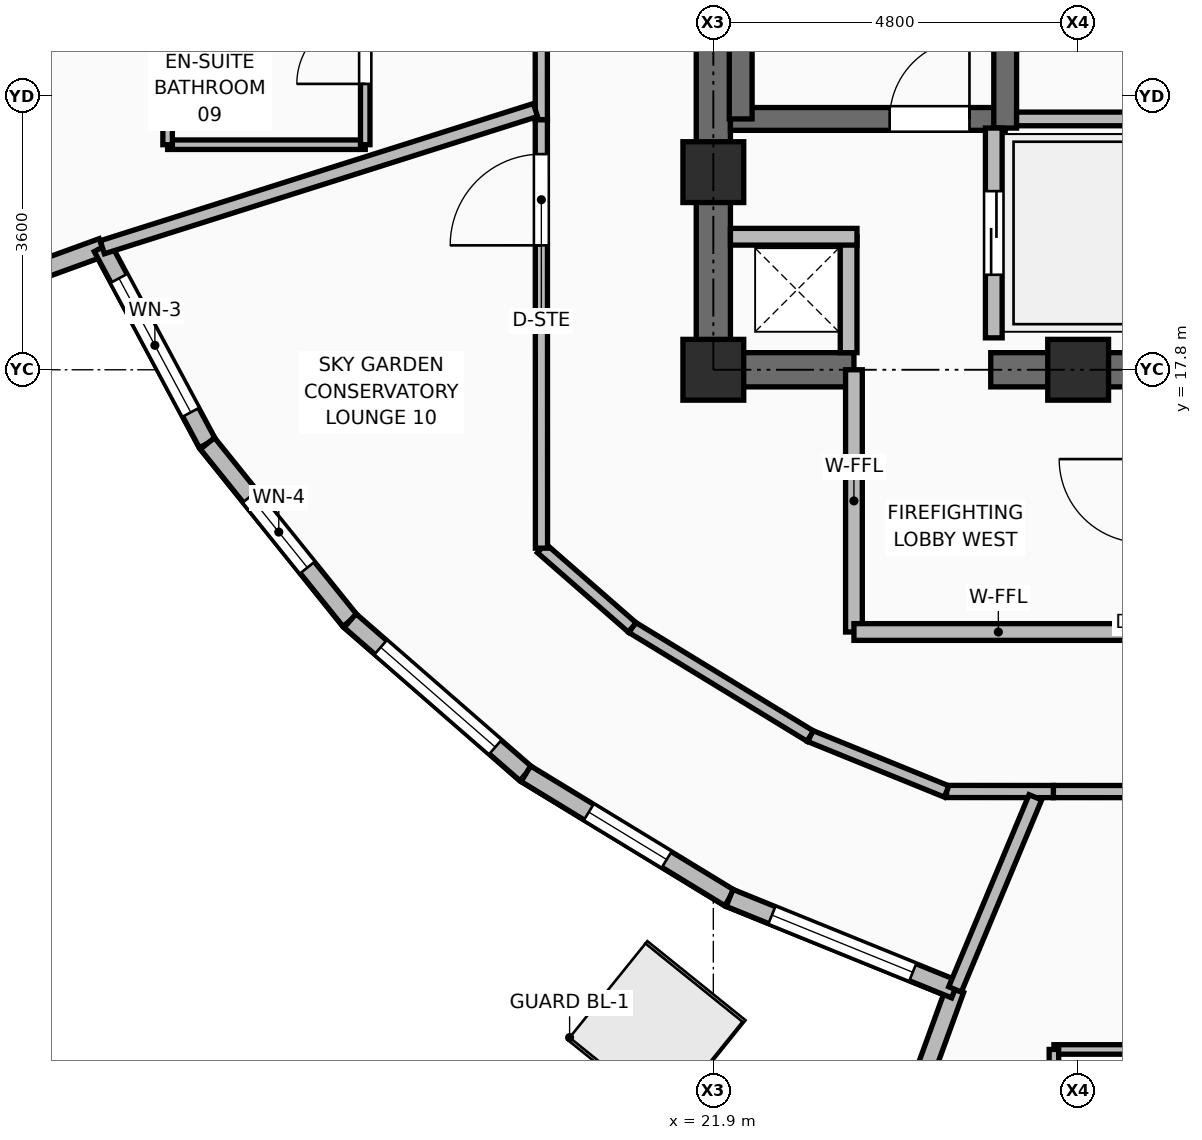
"""IFC4 building model, lengths in metres.
Left out: names, types, materials, properties, quantities, classifications, styles, units other than length and angle.
Written with IfcOpenShell. Run it as: python <this file> out.ifc"""

import sys

from ifc_helpers import new_model, si_unit, direction, frame, frame_2d, origin, origin_2d, place, context, subcontext, project, spatial, rectangle, extrude, element, fill, save


model = new_model("IFC4")
c1 = context("Model", 3, precision=1e-05, world=origin(), true_north=direction((0.0, 1.0)))
c2 = subcontext(c1, "Body", "Model", "MODEL_VIEW")
j1 = project(units=[si_unit("LENGTHUNIT", "METRE"), si_unit("PLANEANGLEUNIT", "RADIAN")], contexts=[c1])
p1 = place(None, origin())
s1 = spatial("IfcSite", under=j1, at=p1, CompositionType="ELEMENT")
p2 = place(p1, origin())
s2 = spatial("IfcBuilding", under=s1, at=p2, CompositionType="ELEMENT")
p3 = place(p2, frame((0.0, 0.0, 212.4)))
s3 = spatial("IfcBuildingStorey", under=s2, at=p3, CompositionType="ELEMENT", Elevation=212.4)
for number, where, z_axis, x_axis in (
    (1, (21.9, 17.8, 0.0), (0.0, 0.0, 1.0), (1.0, 0.0, 0.0)),
    (2, (26.7, 17.8, 0.0), (0.0, 0.0, 1.0), (1.0, 0.0, 0.0)),
    (3, (21.9, 20.4, 0.0), (0.0, 0.0, 1.0), (1.0, 0.0, 0.0)),
):
    element("IfcColumn", number, at=place(p3, frame(where, z_axis=z_axis, x_axis=x_axis)), inside=s3, PredefinedType="COLUMN", context=c2, shape_type="SweptSolid", body=[
        extrude(rectangle(XDim=0.8, YDim=0.8, at=origin_2d()), origin(), (0.0, 0.0, 1.0), 3.75),
    ])
p4 = place(p3, frame((10.29, 18.113, 0.0), z_axis=(0.0, 0.0, 1.0), x_axis=(0.939750271596, 0.34186170747, 0.0)))
e4 = element("IfcWall", 4, at=p4, inside=s3, PredefinedType="SOLIDWALL", context=c2, shape_type="SweptSolid", body=[
    extrude(rectangle(XDim=3.8, YDim=0.24, at=frame_2d((1.9, 0.0))), origin(), (0.0, 0.0, 1.0), 3.57),
])
p5 = place(p3, frame((25.08, 9.648, 0.0), z_axis=(0.0, 0.0, 1.0), x_axis=(-0.342088633789, -0.939667689469, 0.0)))
e5 = element("IfcWall", 5, at=p5, inside=s3, PredefinedType="SOLIDWALL", context=c2, shape_type="SweptSolid", body=[
    extrude(rectangle(XDim=3.8, YDim=0.24, at=frame_2d((1.9, 0.0))), origin(), (0.0, 0.0, 1.0), 3.57),
])
p6 = place(p3, frame((13.861, 19.412, 0.0), z_axis=(0.0, 0.0, 1.0), x_axis=(0.472249177179, -0.881465095539, 0.0)))
e6 = element("IfcWall", 6, at=p6, inside=s3, PredefinedType="SOLIDWALL", context=c2, shape_type="SweptSolid", body=[
    extrude(rectangle(XDim=2.928, YDim=0.24, at=frame_2d((1.464, 0.0))), origin(), (0.0, 0.0, 1.0), 3.57),
])
p7 = place(p6, frame((0.464, 0.0, 0.85)))
e7 = element("IfcOpeningElement", 7, at=p7, cuts=e6, PredefinedType="OPENING", context=c2, shape_type="SweptSolid", body=[
    extrude(rectangle(XDim=2.0, YDim=2.4, at=frame_2d((1.0, 1.2))), frame((0.0, 0.13, 0.0), z_axis=(0.0, -1.0, 0.0), x_axis=(1.0, 0.0, 0.0)), (0.0, 0.0, 1.0), 0.26),
])
p8 = place(p3, frame((15.244, 16.831, 0.0), z_axis=(0.0, 0.0, 1.0), x_axis=(0.627049238015, -0.778979623036, 0.0)))
e8 = element("IfcWall", 8, at=p8, inside=s3, PredefinedType="SOLIDWALL", context=c2, shape_type="SweptSolid", body=[
    extrude(rectangle(XDim=2.994, YDim=0.24, at=frame_2d((1.497, 0.0))), origin(), (0.0, 0.0, 1.0), 3.57),
])
p9 = place(p8, frame((0.897, 0.0, 0.85)))
e9 = element("IfcOpeningElement", 9, at=p9, cuts=e8, PredefinedType="OPENING", context=c2, shape_type="SweptSolid", body=[
    extrude(rectangle(XDim=1.2, YDim=1.8, at=frame_2d((0.6, 0.9))), frame((0.0, 0.13, 0.0), z_axis=(0.0, -1.0, 0.0), x_axis=(1.0, 0.0, 0.0)), (0.0, 0.0, 1.0), 0.26),
])
p10 = place(p3, frame((17.121, 14.499, 0.0), z_axis=(0.0, 0.0, 1.0), x_axis=(0.754182059507, -0.656665379868, 0.0)))
e10 = element("IfcWall", 10, at=p10, inside=s3, PredefinedType="SOLIDWALL", context=c2, shape_type="SweptSolid", body=[
    extrude(rectangle(XDim=3.067, YDim=0.24, at=frame_2d((1.533, 0.0))), origin(), (0.0, 0.0, 1.0), 3.57),
])
p11 = place(p10, frame((0.533, 0.0, 0.85)))
e11 = element("IfcOpeningElement", 11, at=p11, cuts=e10, PredefinedType="OPENING", context=c2, shape_type="SweptSolid", body=[
    extrude(rectangle(XDim=2.0, YDim=2.4, at=frame_2d((1.0, 1.2))), frame((0.0, 0.13, 0.0), z_axis=(0.0, -1.0, 0.0), x_axis=(1.0, 0.0, 0.0)), (0.0, 0.0, 1.0), 0.26),
])
p12 = place(p3, frame((19.434, 12.485, 0.0), z_axis=(0.0, 0.0, 1.0), x_axis=(0.853944577142, -0.520363967979, 0.0)))
e12 = element("IfcWall", 12, at=p12, inside=s3, PredefinedType="SOLIDWALL", context=c2, shape_type="SweptSolid", body=[
    extrude(rectangle(XDim=3.138, YDim=0.24, at=frame_2d((1.569, 0.0))), origin(), (0.0, 0.0, 1.0), 3.57),
])
p13 = place(p12, frame((0.969, 0.0, 0.85)))
e13 = element("IfcOpeningElement", 13, at=p13, cuts=e12, PredefinedType="OPENING", context=c2, shape_type="SweptSolid", body=[
    extrude(rectangle(XDim=1.2, YDim=1.8, at=frame_2d((0.6, 0.9))), frame((0.0, 0.13, 0.0), z_axis=(0.0, -1.0, 0.0), x_axis=(1.0, 0.0, 0.0)), (0.0, 0.0, 1.0), 0.26),
])
p14 = place(p3, frame((22.114, 10.852, 0.0), z_axis=(0.0, 0.0, 1.0), x_axis=(0.926560458876, -0.376145870704, 0.0)))
e14 = element("IfcWall", 14, at=p14, inside=s3, PredefinedType="SOLIDWALL", context=c2, shape_type="SweptSolid", body=[
    extrude(rectangle(XDim=3.201, YDim=0.24, at=frame_2d((1.601, 0.0))), origin(), (0.0, 0.0, 1.0), 3.57),
])
p15 = place(p14, frame((0.601, 0.0, 0.85)))
e15 = element("IfcOpeningElement", 15, at=p15, cuts=e14, PredefinedType="OPENING", context=c2, shape_type="SweptSolid", body=[
    extrude(rectangle(XDim=2.0, YDim=2.4, at=frame_2d((1.0, 1.2))), frame((0.0, 0.13, 0.0), z_axis=(0.0, -1.0, 0.0), x_axis=(1.0, 0.0, 0.0)), (0.0, 0.0, 1.0), 0.26),
])
p16 = place(p3, frame((21.675, 17.8, 0.0), z_axis=(0.0, 0.0, 1.0), x_axis=(1.0, 0.0, 0.0)))
e16 = element("IfcWall", 16, at=p16, inside=s3, PredefinedType="SHEAR", context=c2, shape_type="SweptSolid", body=[
    extrude(rectangle(XDim=2.075, YDim=0.45, at=frame_2d((1.038, 0.0))), origin(), (0.0, 0.0, 1.0), 3.57),
])
p17 = place(p3, frame((25.55, 17.8, 0.0), z_axis=(0.0, 0.0, 1.0), x_axis=(1.0, 0.0, 0.0)))
e17 = element("IfcWall", 17, at=p17, inside=s3, PredefinedType="SHEAR", context=c2, shape_type="SweptSolid", body=[
    extrude(rectangle(XDim=6.9, YDim=0.45, at=frame_2d((3.45, 0.0))), origin(), (0.0, 0.0, 1.0), 3.57),
])
p18 = place(p3, frame((21.9, 18.025, 0.0), z_axis=(0.0, 0.0, 1.0), x_axis=(0.0, 1.0, 0.0)))
e18 = element("IfcWall", 18, at=p18, inside=s3, PredefinedType="SHEAR", context=c2, shape_type="SweptSolid", body=[
    extrude(rectangle(XDim=14.2, YDim=0.45, at=frame_2d((7.1, 0.0))), origin(), (0.0, 0.0, 1.0), 3.57),
])
p19 = place(p3, frame((22.125, 21.1, 0.0), z_axis=(0.0, 0.0, 1.0), x_axis=(1.0, 0.0, 0.0)))
e19 = element("IfcWall", 19, at=p19, inside=s3, PredefinedType="SHEAR", context=c2, shape_type="SweptSolid", body=[
    extrude(rectangle(XDim=3.615, YDim=0.3, at=frame_2d((1.808, 0.0))), origin(), (0.0, 0.0, 1.0), 3.57),
])
p20 = place(p19, frame((2.095, 0.0, 0.0)))
e20 = element("IfcOpeningElement", 20, at=p20, cuts=e19, PredefinedType="OPENING", context=c2, shape_type="SweptSolid", body=[
    extrude(rectangle(XDim=1.05, YDim=2.1, at=frame_2d((0.525, 1.05))), frame((0.0, 0.16, 0.0), z_axis=(0.0, -1.0, 0.0), x_axis=(1.0, 0.0, 0.0)), (0.0, 0.0, 1.0), 0.32),
])
p21 = place(p3, frame((25.74, 20.98, 0.0), z_axis=(0.0, 0.0, 1.0), x_axis=(0.0, 1.0, 0.0)))
e21 = element("IfcWall", 21, at=p21, inside=s3, PredefinedType="SHEAR", context=c2, shape_type="SweptSolid", body=[
    extrude(rectangle(XDim=7.99, YDim=0.3, at=frame_2d((3.995, 0.0))), origin(), (0.0, 0.0, 1.0), 3.57),
])
p22 = place(p3, frame((22.26, 21.1, 0.0), z_axis=(0.0, 0.0, 1.0), x_axis=(0.0, 1.0, 0.0)))
e22 = element("IfcWall", 22, at=p22, inside=s3, PredefinedType="SHEAR", context=c2, shape_type="SweptSolid", body=[
    extrude(rectangle(XDim=7.75, YDim=0.3, at=frame_2d((3.875, 0.0))), origin(), (0.0, 0.0, 1.0), 3.57),
])
p23 = place(p3, frame((23.68, 18.025, 0.0), z_axis=(0.0, 0.0, 1.0), x_axis=(0.0, 1.0, 0.0)))
e23 = element("IfcWall", 23, at=p23, inside=s3, PredefinedType="PARTITIONING", context=c2, shape_type="SweptSolid", body=[
    extrude(rectangle(XDim=1.525, YDim=0.22, at=frame_2d((0.763, 0.0))), origin(), (0.0, 0.0, 1.0), 3.55),
])
p24 = place(p3, frame((22.125, 19.55, 0.0), z_axis=(0.0, 0.0, 1.0), x_axis=(1.0, 0.0, 0.0)))
e24 = element("IfcWall", 24, at=p24, inside=s3, PredefinedType="PARTITIONING", context=c2, shape_type="SweptSolid", body=[
    extrude(rectangle(XDim=1.665, YDim=0.22, at=frame_2d((0.833, 0.0))), origin(), (0.0, 0.0, 1.0), 2.595),
])
p25 = place(p3, frame((25.59, 18.22, 0.0), z_axis=(0.0, 0.0, 1.0), x_axis=(0.0, 1.0, 0.0)))
e25 = element("IfcWall", 25, at=p25, inside=s3, PredefinedType="PARTITIONING", context=c2, shape_type="SweptSolid", body=[
    extrude(rectangle(XDim=2.76, YDim=0.22, at=frame_2d((1.38, 0.0))), origin(), (0.0, 0.0, 1.0), 3.55),
])
p26 = place(p25, frame((0.83, 0.0, 0.0)))
e26 = element("IfcOpeningElement", 26, at=p26, cuts=e25, PredefinedType="OPENING", context=c2, shape_type="SweptSolid", body=[
    extrude(rectangle(XDim=1.1, YDim=2.2, at=frame_2d((0.55, 1.1))), frame((0.0, 0.12, 0.0), z_axis=(0.0, -1.0, 0.0), x_axis=(1.0, 0.0, 0.0)), (0.0, 0.0, 1.0), 0.24),
])
p27 = place(p3, frame((25.89, 21.1, 0.0), z_axis=(0.0, 0.0, 1.0), x_axis=(1.0, 0.0, 0.0)))
e27 = element("IfcWall", 27, at=p27, inside=s3, PredefinedType="PARTITIONING", context=c2, shape_type="SweptSolid", body=[
    extrude(rectangle(XDim=1.7, YDim=0.18, at=frame_2d((0.85, 0.0))), origin(), (0.0, 0.0, 1.0), 3.55),
])
p28 = place(p3, frame((23.75, 14.35, 0.0), z_axis=(0.0, 0.0, 1.0), x_axis=(0.0, 1.0, 0.0)))
e28 = element("IfcWall", 28, at=p28, inside=s3, PredefinedType="PARTITIONING", context=c2, shape_type="SweptSolid", body=[
    extrude(rectangle(XDim=3.45, YDim=0.22, at=frame_2d((1.725, 0.0))), origin(), (0.0, 0.0, 1.0), 3.081),
])
p29 = place(p3, frame((23.75, 14.35, 0.0), z_axis=(0.0, 0.0, 1.0), x_axis=(1.0, 0.0, 0.0)))
e29 = element("IfcWall", 29, at=p29, inside=s3, PredefinedType="PARTITIONING", context=c2, shape_type="SweptSolid", body=[
    extrude(rectangle(XDim=3.8, YDim=0.22, at=frame_2d((1.9, 0.0))), origin(), (0.0, 0.0, 1.0), 3.55),
])
p30 = place(p3, frame((30.26, 12.25, 0.0), z_axis=(0.0, 0.0, 1.0), x_axis=(-0.999999968423, 0.00025130363, 0.0)))
e30 = element("IfcWall", 30, at=p30, inside=s3, PredefinedType="PARTITIONING", context=c2, shape_type="SweptSolid", body=[
    extrude(rectangle(XDim=3.886, YDim=0.16, at=frame_2d((1.943, 0.0))), origin(), (0.0, 0.0, 1.0), 3.55),
])
p31 = place(p30, frame((0.16, 0.0, 0.0)))
e31 = element("IfcOpeningElement", 31, at=p31, cuts=e30, PredefinedType="OPENING", context=c2, shape_type="SweptSolid", body=[
    extrude(rectangle(XDim=1.0, YDim=2.1, at=frame_2d((0.5, 1.05))), frame((0.0, 0.09, 0.0), z_axis=(0.0, -1.0, 0.0), x_axis=(1.0, 0.0, 0.0)), (0.0, 0.0, 1.0), 0.18),
])
p32 = place(p3, frame((26.374, 12.251, 0.0), z_axis=(0.0, 0.0, 1.0), x_axis=(-0.999999758454, 0.000695047617, 0.0)))
e32 = element("IfcWall", 32, at=p32, inside=s3, PredefinedType="PARTITIONING", context=c2, shape_type="SweptSolid", body=[
    extrude(rectangle(XDim=1.405, YDim=0.16, at=frame_2d((0.703, 0.0))), origin(), (0.0, 0.0, 1.0), 3.55),
])
p33 = place(p3, frame((24.969, 12.252, 0.0), z_axis=(0.0, 0.0, 1.0), x_axis=(-0.926428103937, 0.376471736303, 0.0)))
e33 = element("IfcWall", 33, at=p33, inside=s3, PredefinedType="PARTITIONING", context=c2, shape_type="SweptSolid", body=[
    extrude(rectangle(XDim=1.937, YDim=0.16, at=frame_2d((0.968, 0.0))), origin(), (0.0, 0.0, 1.0), 3.55),
])
p34 = place(p3, frame((23.175, 12.981, 0.0), z_axis=(0.0, 0.0, 1.0), x_axis=(-0.853653362976, 0.520841565047, 0.0)))
e34 = element("IfcWall", 34, at=p34, inside=s3, PredefinedType="PARTITIONING", context=c2, shape_type="SweptSolid", body=[
    extrude(rectangle(XDim=2.744, YDim=0.16, at=frame_2d((1.372, 0.0))), origin(), (0.0, 0.0, 1.0), 3.081),
])
p35 = place(p3, frame((20.833, 14.41, 0.0), z_axis=(0.0, 0.0, 1.0), x_axis=(-0.753158287048, 0.657839338023, 0.0)))
e35 = element("IfcWall", 35, at=p35, inside=s3, PredefinedType="PARTITIONING", context=c2, shape_type="SweptSolid", body=[
    extrude(rectangle(XDim=1.585, YDim=0.16, at=frame_2d((0.793, 0.0))), origin(), (0.0, 0.0, 1.0), 3.55),
])
p36 = place(p3, frame((19.639, 15.453, 0.0), z_axis=(0.0, 0.0, 1.0), x_axis=(-0.000346410302, 0.99999994, 0.0)))
e36 = element("IfcWall", 36, at=p36, inside=s3, PredefinedType="PARTITIONING", context=c2, shape_type="SweptSolid", body=[
    extrude(rectangle(XDim=5.638, YDim=0.16, at=frame_2d((2.819, 0.0))), origin(), (0.0, 0.0, 1.0), 3.081),
])
p37 = place(p36, frame((3.984, 0.0, 0.0)))
e37 = element("IfcOpeningElement", 37, at=p37, cuts=e36, PredefinedType="OPENING", context=c2, shape_type="SweptSolid", body=[
    extrude(rectangle(XDim=1.2, YDim=2.1, at=frame_2d((0.6, 1.05))), frame((0.0, 0.09, 0.0), z_axis=(0.0, -1.0, 0.0), x_axis=(1.0, 0.0, 0.0)), (0.0, 0.0, 1.0), 0.18),
])
p38 = place(p3, frame((19.637, 21.091, 0.0), z_axis=(0.0, 0.0, 1.0), x_axis=(-0.000352951535, 0.999999937713, 0.0)))
e38 = element("IfcWall", 38, at=p38, inside=s3, PredefinedType="PARTITIONING", context=c2, shape_type="SweptSolid", body=[
    extrude(rectangle(XDim=2.767, YDim=0.16, at=frame_2d((1.383, 0.0))), origin(), (0.0, 0.0, 1.0), 3.081),
])
p39 = place(p38, frame((1.028, 0.0, 0.0)))
e39 = element("IfcOpeningElement", 39, at=p39, cuts=e38, PredefinedType="OPENING", context=c2, shape_type="SweptSolid", body=[
    extrude(rectangle(XDim=1.0, YDim=2.1, at=frame_2d((0.5, 1.05))), frame((0.0, 0.09, 0.0), z_axis=(0.0, -1.0, 0.0), x_axis=(1.0, 0.0, 0.0)), (0.0, 0.0, 1.0), 0.18),
])
p40 = place(p3, frame((19.56, 21.217, 0.0), z_axis=(0.0, 0.0, 1.0), x_axis=(-0.95332988283, -0.301930678309, 0.0)))
e40 = element("IfcWall", 40, at=p40, inside=s3, PredefinedType="PARTITIONING", context=c2, shape_type="SweptSolid", body=[
    extrude(rectangle(XDim=5.978, YDim=0.18, at=frame_2d((2.989, 0.0))), origin(), (0.0, 0.0, 1.0), 3.081),
])
p41 = place(p3, frame((26.137, 12.175, 0.0), z_axis=(0.0, 0.0, 1.0), x_axis=(-0.385836474989, -0.922567187021, 0.0)))
e41 = element("IfcWall", 41, at=p41, inside=s3, PredefinedType="PARTITIONING", context=c2, shape_type="SweptSolid", body=[
    extrude(rectangle(XDim=2.739, YDim=0.18, at=frame_2d((1.37, 0.0))), origin(), (0.0, 0.0, 1.0), 3.55),
])
p42 = place(p3, frame((14.72, 20.761, 0.0), z_axis=(0.0, 0.0, 1.0), x_axis=(1.0, 0.0, 0.0)))
e42 = element("IfcWall", 42, at=p42, inside=s3, PredefinedType="PARTITIONING", context=c2, shape_type="SweptSolid", body=[
    extrude(rectangle(XDim=2.6, YDim=0.125, at=frame_2d((1.3, 0.0))), origin(), (0.0, 0.0, 1.0), 3.55),
])
p43 = place(p3, frame((14.72, 20.761, 0.0), z_axis=(0.0, 0.0, 1.0), x_axis=(0.0, 1.0, 0.0)))
e43 = element("IfcWall", 43, at=p43, inside=s3, PredefinedType="PARTITIONING", context=c2, shape_type="SweptSolid", body=[
    extrude(rectangle(XDim=2.5, YDim=0.125, at=frame_2d((1.25, 0.0))), origin(), (0.0, 0.0, 1.0), 3.081),
])
p44 = place(p3, frame((17.32, 20.761, 0.0), z_axis=(0.0, 0.0, 1.0), x_axis=(0.0, 1.0, 0.0)))
e44 = element("IfcWall", 44, at=p44, inside=s3, PredefinedType="PARTITIONING", context=c2, shape_type="SweptSolid", body=[
    extrude(rectangle(XDim=2.5, YDim=0.125, at=frame_2d((1.25, 0.0))), origin(), (0.0, 0.0, 1.0), 3.081),
])
p45 = place(p44, frame((0.8, 0.0, 0.0)))
e45 = element("IfcOpeningElement", 45, at=p45, cuts=e44, PredefinedType="OPENING", context=c2, shape_type="SweptSolid", body=[
    extrude(rectangle(XDim=0.9, YDim=2.1, at=frame_2d((0.45, 1.05))), frame((0.0, 0.073, 0.0), z_axis=(0.0, -1.0, 0.0), x_axis=(1.0, 0.0, 0.0)), (0.0, 0.0, 1.0), 0.145),
])
p46 = place(p3, frame((26.381, 8.858, 0.0), z_axis=(0.0, 0.0, 1.0), x_axis=(1.0, 0.0, 0.0)))
e46 = element("IfcWall", 46, at=p46, inside=s3, PredefinedType="PARTITIONING", context=c2, shape_type="SweptSolid", body=[
    extrude(rectangle(XDim=2.35, YDim=0.125, at=frame_2d((1.175, 0.0))), origin(), (0.0, 0.0, 1.0), 3.55),
])
p47 = place(p3, frame((26.381, 6.558, 0.0), z_axis=(0.0, 0.0, 1.0), x_axis=(0.0, 1.0, 0.0)))
e47 = element("IfcWall", 47, at=p47, inside=s3, PredefinedType="PARTITIONING", context=c2, shape_type="SweptSolid", body=[
    extrude(rectangle(XDim=2.3, YDim=0.125, at=frame_2d((1.15, 0.0))), origin(), (0.0, 0.0, 1.0), 2.925),
])
p48 = place(p7, origin())
e48 = element("IfcWindow", 48, at=p48, inside=s3, PartitioningType="SINGLE_PANEL", PredefinedType="WINDOW", context=c2, shape_type="SweptSolid", body=[
    extrude(rectangle(XDim=2.0, YDim=2.4, at=frame_2d((1.0, 1.2))), frame((0.0, 0.03, 0.0), z_axis=(0.0, -1.0, 0.0), x_axis=(1.0, 0.0, 0.0)), (0.0, 0.0, 1.0), 0.06),
])
fill(e7, e48)
p49 = place(p9, origin())
e49 = element("IfcWindow", 49, at=p49, inside=s3, PartitioningType="SINGLE_PANEL", PredefinedType="WINDOW", context=c2, shape_type="SweptSolid", body=[
    extrude(rectangle(XDim=1.2, YDim=1.8, at=frame_2d((0.6, 0.9))), frame((0.0, 0.03, 0.0), z_axis=(0.0, -1.0, 0.0), x_axis=(1.0, 0.0, 0.0)), (0.0, 0.0, 1.0), 0.06),
])
fill(e9, e49)
p50 = place(p11, origin())
e50 = element("IfcWindow", 50, at=p50, inside=s3, PartitioningType="SINGLE_PANEL", PredefinedType="WINDOW", context=c2, shape_type="SweptSolid", body=[
    extrude(rectangle(XDim=2.0, YDim=2.4, at=frame_2d((1.0, 1.2))), frame((0.0, 0.03, 0.0), z_axis=(0.0, -1.0, 0.0), x_axis=(1.0, 0.0, 0.0)), (0.0, 0.0, 1.0), 0.06),
])
fill(e11, e50)
p51 = place(p13, origin())
e51 = element("IfcWindow", 51, at=p51, inside=s3, PartitioningType="SINGLE_PANEL", PredefinedType="WINDOW", context=c2, shape_type="SweptSolid", body=[
    extrude(rectangle(XDim=1.2, YDim=1.8, at=frame_2d((0.6, 0.9))), frame((0.0, 0.03, 0.0), z_axis=(0.0, -1.0, 0.0), x_axis=(1.0, 0.0, 0.0)), (0.0, 0.0, 1.0), 0.06),
])
fill(e13, e51)
p52 = place(p15, origin())
e52 = element("IfcWindow", 52, at=p52, inside=s3, PartitioningType="SINGLE_PANEL", PredefinedType="WINDOW", context=c2, shape_type="SweptSolid", body=[
    extrude(rectangle(XDim=2.0, YDim=2.4, at=frame_2d((1.0, 1.2))), frame((0.0, 0.03, 0.0), z_axis=(0.0, -1.0, 0.0), x_axis=(1.0, 0.0, 0.0)), (0.0, 0.0, 1.0), 0.06),
])
fill(e15, e52)
p53 = place(p20, origin())
e53 = element("IfcDoor", 53, at=p53, inside=s3, OperationType="SINGLE_SWING_RIGHT", PredefinedType="DOOR", context=c2, shape_type="SweptSolid", body=[
    extrude(rectangle(XDim=1.05, YDim=2.1, at=frame_2d((0.525, 1.05))), frame((0.0, 0.025, 0.0), z_axis=(0.0, -1.0, 0.0), x_axis=(1.0, 0.0, 0.0)), (0.0, 0.0, 1.0), 0.05),
])
fill(e20, e53)
p54 = place(p26, origin())
e54 = element("IfcDoor", 54, at=p54, inside=s3, OperationType="DOUBLE_DOOR_SLIDING", PredefinedType="DOOR", context=c2, shape_type="SweptSolid", body=[
    extrude(rectangle(XDim=1.1, YDim=2.2, at=frame_2d((0.55, 1.1))), frame((0.0, 0.025, 0.0), z_axis=(0.0, -1.0, 0.0), x_axis=(1.0, 0.0, 0.0)), (0.0, 0.0, 1.0), 0.05),
])
fill(e26, e54)
p55 = place(p45, origin())
e55 = element("IfcDoor", 55, at=p55, inside=s3, OperationType="SINGLE_SWING_LEFT", PredefinedType="DOOR", context=c2, shape_type="SweptSolid", body=[
    extrude(rectangle(XDim=0.9, YDim=2.1, at=frame_2d((0.45, 1.05))), frame((0.0, 0.025, 0.0), z_axis=(0.0, -1.0, 0.0), x_axis=(1.0, 0.0, 0.0)), (0.0, 0.0, 1.0), 0.05),
])
fill(e45, e55)
p56 = place(p37, origin())
e56 = element("IfcDoor", 56, at=p56, inside=s3, OperationType="SINGLE_SWING_LEFT", PredefinedType="DOOR", context=c2, shape_type="SweptSolid", body=[
    extrude(rectangle(XDim=1.2, YDim=2.1, at=frame_2d((0.6, 1.05))), frame((0.0, 0.025, 0.0), z_axis=(0.0, -1.0, 0.0), x_axis=(1.0, 0.0, 0.0)), (0.0, 0.0, 1.0), 0.05),
])
fill(e37, e56)
save(model, sys.argv[1])
